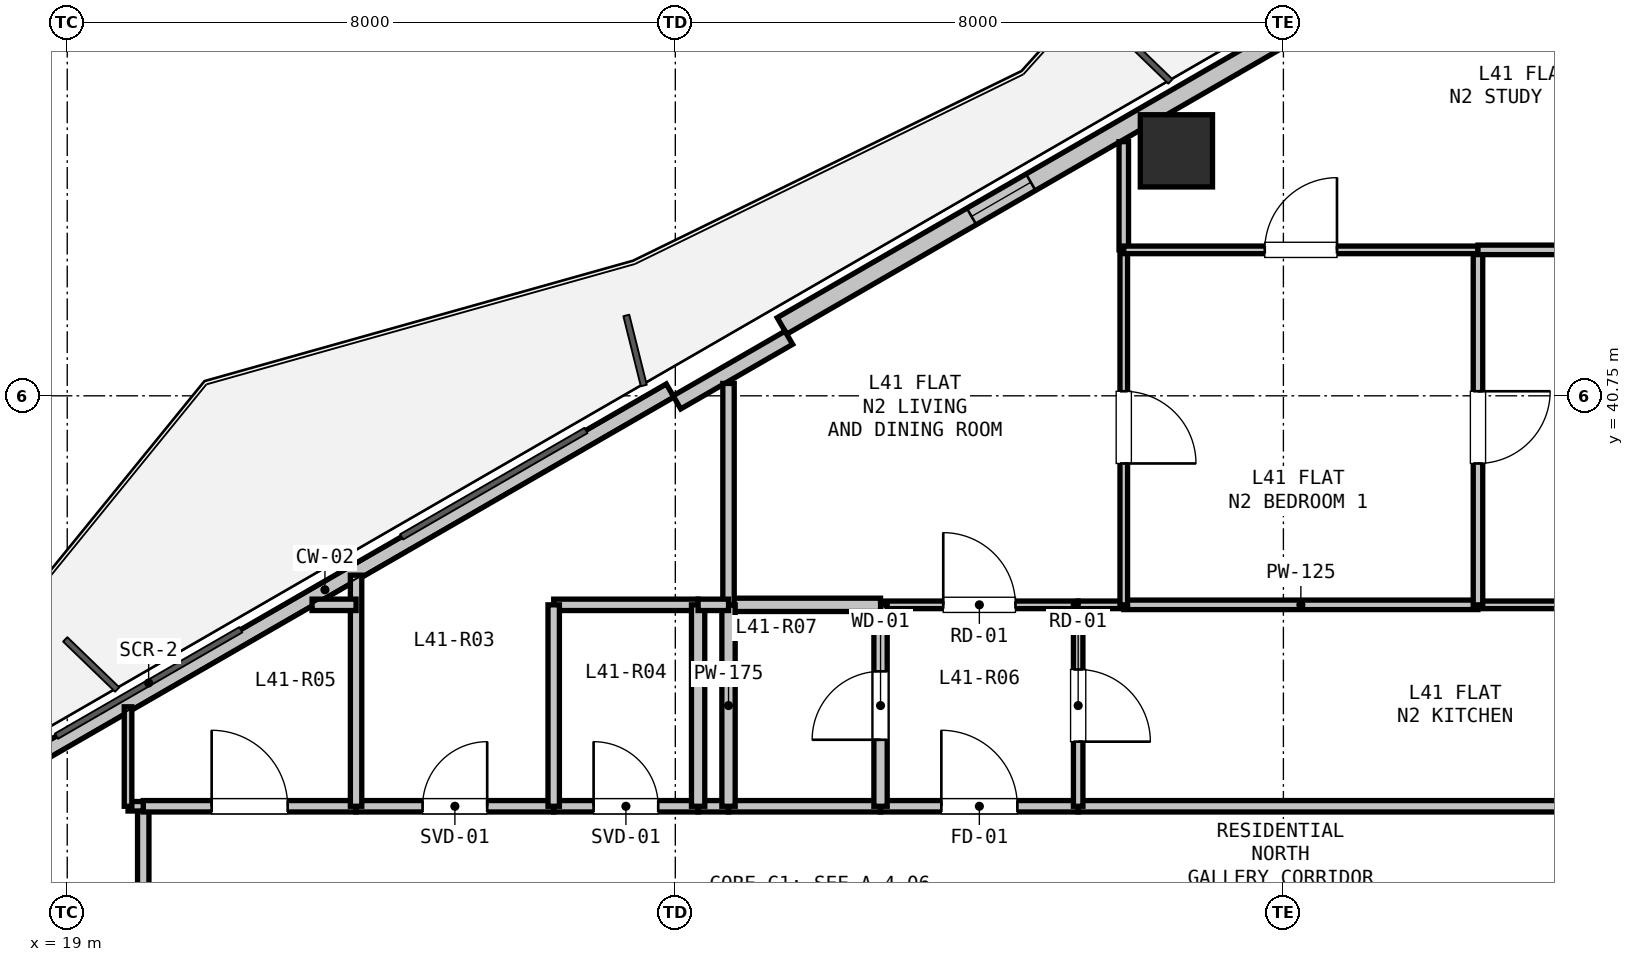
"""IFC4 building model, lengths in metres.
Left out: names, types, materials, properties, quantities, classifications, styles, units other than length and angle.
Written with IfcOpenShell. Run it as: python <this file> out.ifc"""

import sys

from ifc_helpers import new_model, si_unit, direction, frame, frame_2d, origin, origin_2d, place, context, subcontext, project, spatial, rectangle, hollow_rectangle, extrude, element, fill, save


model = new_model("IFC4")
c1 = context("Model", 3, precision=1e-05, world=origin(), true_north=direction((0.0, 1.0)))
c2 = subcontext(c1, "Body", "Model", "MODEL_VIEW")
j1 = project(units=[si_unit("LENGTHUNIT", "METRE"), si_unit("PLANEANGLEUNIT", "RADIAN")], contexts=[c1])
p1 = place(None, origin())
s1 = spatial("IfcSite", under=j1, at=p1, CompositionType="ELEMENT")
p2 = place(p1, origin())
s2 = spatial("IfcBuilding", under=s1, at=p2, CompositionType="ELEMENT")
p3 = place(p2, frame((0.0, 0.0, 147.6)))
s3 = spatial("IfcBuildingStorey", under=s2, at=p3, CompositionType="ELEMENT", Elevation=147.6)
p4 = place(p3, frame((33.593, 43.973, 0.0), z_axis=(0.0, 0.0, 1.0), x_axis=(1.0, 0.0, 0.0)))
e1 = element("IfcColumn", 1, at=p4, inside=s3, PredefinedType="COLUMN", context=c2, shape_type="SweptSolid", body=[
    extrude(hollow_rectangle(XDim=0.95, YDim=0.95, WallThickness=0.028, at=origin_2d()), origin(), (0.0, 0.0, 1.0), 3.3),
])
p5 = place(p3, frame((38.22, 47.338, 0.0), z_axis=(0.0, 0.0, 1.0), x_axis=(0.866035021055, -0.499983342029, 0.0)))
e2 = element("IfcWall", 2, at=p5, inside=s3, PredefinedType="SOLIDWALL", context=c2, shape_type="SweptSolid", body=[
    extrude(rectangle(XDim=4.617, YDim=0.25, at=frame_2d((2.309, 0.0))), origin(), (0.0, 0.0, 1.0), 2.68),
])
p6 = place(p3, frame((17.85, 35.577, 0.0), z_axis=(0.0, 0.0, 1.0), x_axis=(0.866026619769, 0.499997893847, 0.0)))
e3 = element("IfcWall", 3, at=p6, inside=s3, PredefinedType="PARAPET", context=c2, shape_type="SweptSolid", body=[
    extrude(rectangle(XDim=10.486, YDim=0.2, at=frame_2d((5.243, 0.0))), origin(), (0.0, 0.0, 1.0), 0.2),
])
p7 = place(p3, frame((28.403, 41.67, 0.0), z_axis=(0.0, 0.0, 1.0), x_axis=(0.86602239209, 0.500005216371, 0.0)))
e4 = element("IfcWall", 4, at=p7, inside=s3, PredefinedType="SOLIDWALL", context=c2, shape_type="SweptSolid", body=[
    extrude(rectangle(XDim=11.186, YDim=0.25, at=frame_2d((5.593, 0.0))), origin(), (0.0, 0.0, 1.0), 2.68),
])
p8 = place(p7, frame((2.88, 0.0, 0.9)))
e5 = element("IfcOpeningElement", 5, at=p8, cuts=e4, PredefinedType="OPENING", context=c2, shape_type="SweptSolid", body=[
    extrude(rectangle(XDim=0.9, YDim=1.4, at=frame_2d((0.45, 0.7))), frame((0.0, 0.135, 0.0), z_axis=(0.0, -1.0, 0.0), x_axis=(1.0, 0.0, 0.0)), (0.0, 0.0, 1.0), 0.27),
])
p9 = place(p3, frame((27.021, 40.664, 0.0), z_axis=(0.0, 0.0, 1.0), x_axis=(0.86605165483, 0.499954529098, 0.0)))
e6 = element("IfcWall", 6, at=p9, inside=s3, PredefinedType="PARAPET", context=c2, shape_type="SweptSolid", body=[
    extrude(rectangle(XDim=1.7, YDim=0.2, at=frame_2d((0.85, 0.0))), origin(), (0.0, 0.0, 1.0), 2.68),
])
p10 = place(p3, frame((20.0, 32.75, 0.0), z_axis=(0.0, 0.0, 1.0), x_axis=(0.0, 1.0, 0.0)))
e7 = element("IfcWall", 7, at=p10, inside=s3, PredefinedType="PARTITIONING", context=c2, shape_type="SweptSolid", body=[
    extrude(rectangle(XDim=2.6, YDim=0.15, at=frame_2d((1.3, 0.0))), origin(), (0.0, 0.0, 1.0), 2.433),
])
p11 = place(p3, frame((20.0, 35.35, 0.0), z_axis=(0.0, 0.0, 1.0), x_axis=(1.0, 0.0, 0.0)))
e8 = element("IfcWall", 8, at=p11, inside=s3, PredefinedType="PARTITIONING", context=c2, shape_type="SweptSolid", body=[
    extrude(rectangle(XDim=2.8, YDim=0.15, at=frame_2d((1.4, 0.0))), origin(), (0.0, 0.0, 1.0), 3.06),
])
p12 = place(p11, frame((0.9, 0.0, 0.0)))
e9 = element("IfcOpeningElement", 9, at=p12, cuts=e8, PredefinedType="OPENING", context=c2, shape_type="SweptSolid", body=[
    extrude(rectangle(XDim=1.0, YDim=2.15, at=frame_2d((0.5, 1.075))), frame((0.0, 0.085, 0.0), z_axis=(0.0, -1.0, 0.0), x_axis=(1.0, 0.0, 0.0)), (0.0, 0.0, 1.0), 0.17),
])
p13 = place(p3, frame((22.8, 35.35, 0.0), z_axis=(0.0, 0.0, 1.0), x_axis=(1.0, 0.0, 0.0)))
e10 = element("IfcWall", 10, at=p13, inside=s3, PredefinedType="PARTITIONING", context=c2, shape_type="SweptSolid", body=[
    extrude(rectangle(XDim=2.6, YDim=0.15, at=frame_2d((1.3, 0.0))), origin(), (0.0, 0.0, 1.0), 3.06),
])
p14 = place(p13, frame((0.875, 0.0, 0.0)))
e11 = element("IfcOpeningElement", 11, at=p14, cuts=e10, PredefinedType="OPENING", context=c2, shape_type="SweptSolid", body=[
    extrude(rectangle(XDim=0.85, YDim=2.1, at=frame_2d((0.425, 1.05))), frame((0.0, 0.085, 0.0), z_axis=(0.0, -1.0, 0.0), x_axis=(1.0, 0.0, 0.0)), (0.0, 0.0, 1.0), 0.17),
])
p15 = place(p3, frame((25.4, 35.35, 0.0), z_axis=(0.0, 0.0, 1.0), x_axis=(1.0, 0.0, 0.0)))
e12 = element("IfcWall", 12, at=p15, inside=s3, PredefinedType="PARTITIONING", context=c2, shape_type="SweptSolid", body=[
    extrude(rectangle(XDim=1.9, YDim=0.15, at=frame_2d((0.95, 0.0))), origin(), (0.0, 0.0, 1.0), 3.06),
])
p16 = place(p15, frame((0.525, 0.0, 0.0)))
e13 = element("IfcOpeningElement", 13, at=p16, cuts=e12, PredefinedType="OPENING", context=c2, shape_type="SweptSolid", body=[
    extrude(rectangle(XDim=0.85, YDim=2.1, at=frame_2d((0.425, 1.05))), frame((0.0, 0.085, 0.0), z_axis=(0.0, -1.0, 0.0), x_axis=(1.0, 0.0, 0.0)), (0.0, 0.0, 1.0), 0.17),
])
p17 = place(p3, frame((27.3, 35.35, 0.0), z_axis=(0.0, 0.0, 1.0), x_axis=(1.0, 0.0, 0.0)))
e14 = element("IfcWall", 14, at=p17, inside=s3, PredefinedType="PARTITIONING", context=c2, shape_type="SweptSolid", body=[
    extrude(rectangle(XDim=0.4, YDim=0.15, at=frame_2d((0.2, 0.0))), origin(), (0.0, 0.0, 1.0), 3.06),
])
p18 = place(p3, frame((27.7, 35.35, 0.0), z_axis=(0.0, 0.0, 1.0), x_axis=(1.0, 0.0, 0.0)))
e15 = element("IfcWall", 15, at=p18, inside=s3, PredefinedType="PARTITIONING", context=c2, shape_type="SweptSolid", body=[
    extrude(rectangle(XDim=2.0, YDim=0.15, at=frame_2d((1.0, 0.0))), origin(), (0.0, 0.0, 1.0), 3.06),
])
p19 = place(p3, frame((29.7, 35.35, 0.0), z_axis=(0.0, 0.0, 1.0), x_axis=(1.0, 0.0, 0.0)))
e16 = element("IfcWall", 16, at=p19, inside=s3, PredefinedType="PARTITIONING", context=c2, shape_type="SweptSolid", body=[
    extrude(rectangle(XDim=2.6, YDim=0.15, at=frame_2d((1.3, 0.0))), origin(), (0.0, 0.0, 1.0), 3.06),
])
p20 = place(p19, frame((0.8, 0.0, 0.0)))
e17 = element("IfcOpeningElement", 17, at=p20, cuts=e16, PredefinedType="OPENING", context=c2, shape_type="SweptSolid", body=[
    extrude(rectangle(XDim=1.0, YDim=2.15, at=frame_2d((0.5, 1.075))), frame((0.0, 0.085, 0.0), z_axis=(0.0, -1.0, 0.0), x_axis=(1.0, 0.0, 0.0)), (0.0, 0.0, 1.0), 0.17),
])
p21 = place(p3, frame((32.3, 35.35, 0.0), z_axis=(0.0, 0.0, 1.0), x_axis=(1.0, 0.0, 0.0)))
e18 = element("IfcWall", 18, at=p21, inside=s3, PredefinedType="PARTITIONING", context=c2, shape_type="SweptSolid", body=[
    extrude(rectangle(XDim=6.9, YDim=0.15, at=frame_2d((3.45, 0.0))), origin(), (0.0, 0.0, 1.0), 2.433),
])
p22 = place(p3, frame((29.7, 38.0, 0.0), z_axis=(0.0, 0.0, 1.0), x_axis=(1.0, 0.0, 0.0)))
e19 = element("IfcWall", 19, at=p22, inside=s3, PredefinedType="PARTITIONING", context=c2, shape_type="SweptSolid", body=[
    extrude(rectangle(XDim=2.6, YDim=0.1, at=frame_2d((1.3, 0.0))), origin(), (0.0, 0.0, 1.0), 3.06),
])
p23 = place(p22, frame((0.825, 0.0, 0.0)))
e20 = element("IfcOpeningElement", 20, at=p23, cuts=e19, PredefinedType="OPENING", context=c2, shape_type="SweptSolid", body=[
    extrude(rectangle(XDim=0.95, YDim=2.1, at=frame_2d((0.475, 1.05))), frame((0.0, 0.06, 0.0), z_axis=(0.0, -1.0, 0.0), x_axis=(1.0, 0.0, 0.0)), (0.0, 0.0, 1.0), 0.12),
])
p24 = place(p3, frame((32.3, 38.0, 0.0), z_axis=(0.0, 0.0, 1.0), x_axis=(0.0, -1.0, 0.0)))
e21 = element("IfcWall", 21, at=p24, inside=s3, PredefinedType="PARTITIONING", context=c2, shape_type="SweptSolid", body=[
    extrude(rectangle(XDim=2.65, YDim=0.125, at=frame_2d((1.325, 0.0))), origin(), (0.0, 0.0, 1.0), 3.06),
])
p25 = place(p24, frame((0.85, 0.0, 0.0)))
e22 = element("IfcOpeningElement", 22, at=p25, cuts=e21, PredefinedType="OPENING", context=c2, shape_type="SweptSolid", body=[
    extrude(rectangle(XDim=0.95, YDim=2.1, at=frame_2d((0.475, 1.05))), frame((0.0, 0.073, 0.0), z_axis=(0.0, -1.0, 0.0), x_axis=(1.0, 0.0, 0.0)), (0.0, 0.0, 1.0), 0.145),
])
p26 = place(p3, frame((29.7, 35.35, 0.0), z_axis=(0.0, 0.0, 1.0), x_axis=(0.0, 1.0, 0.0)))
e23 = element("IfcWall", 23, at=p26, inside=s3, PredefinedType="PLUMBINGWALL", context=c2, shape_type="SweptSolid", body=[
    extrude(rectangle(XDim=2.65, YDim=0.175, at=frame_2d((1.325, 0.0))), origin(), (0.0, 0.0, 1.0), 3.06),
])
p27 = place(p26, frame((0.875, 0.0, 0.0)))
e24 = element("IfcOpeningElement", 24, at=p27, cuts=e23, PredefinedType="OPENING", context=c2, shape_type="SweptSolid", body=[
    extrude(rectangle(XDim=0.9, YDim=2.1, at=frame_2d((0.45, 1.05))), frame((0.0, 0.097, 0.0), z_axis=(0.0, -1.0, 0.0), x_axis=(1.0, 0.0, 0.0)), (0.0, 0.0, 1.0), 0.195),
])
p28 = place(p3, frame((25.4, 38.0, 0.0), z_axis=(0.0, 0.0, 1.0), x_axis=(1.0, 0.0, 0.0)))
e25 = element("IfcWall", 25, at=p28, inside=s3, PredefinedType="PARTITIONING", context=c2, shape_type="SweptSolid", body=[
    extrude(rectangle(XDim=1.9, YDim=0.15, at=frame_2d((0.95, 0.0))), origin(), (0.0, 0.0, 1.0), 3.06),
])
p29 = place(p3, frame((27.3, 38.0, 0.0), z_axis=(0.0, 0.0, 1.0), x_axis=(0.0, -1.0, 0.0)))
e26 = element("IfcWall", 26, at=p29, inside=s3, PredefinedType="PLUMBINGWALL", context=c2, shape_type="SweptSolid", body=[
    extrude(rectangle(XDim=2.65, YDim=0.175, at=frame_2d((1.325, 0.0))), origin(), (0.0, 0.0, 1.0), 3.06),
])
p30 = place(p3, frame((25.4, 35.35, 0.0), z_axis=(0.0, 0.0, 1.0), x_axis=(0.0, 1.0, 0.0)))
e27 = element("IfcWall", 27, at=p30, inside=s3, PredefinedType="PARTITIONING", context=c2, shape_type="SweptSolid", body=[
    extrude(rectangle(XDim=2.65, YDim=0.15, at=frame_2d((1.325, 0.0))), origin(), (0.0, 0.0, 1.0), 3.06),
])
p31 = place(p3, frame((27.7, 38.0, 0.0), z_axis=(0.0, 0.0, 1.0), x_axis=(1.0, 0.0, 0.0)))
e28 = element("IfcWall", 28, at=p31, inside=s3, PredefinedType="PLUMBINGWALL", context=c2, shape_type="SweptSolid", body=[
    extrude(rectangle(XDim=2.0, YDim=0.175, at=frame_2d((1.0, 0.0))), origin(), (0.0, 0.0, 1.0), 3.06),
])
p32 = place(p3, frame((27.7, 35.35, 0.0), z_axis=(0.0, 0.0, 1.0), x_axis=(0.0, 1.0, 0.0)))
e29 = element("IfcWall", 29, at=p32, inside=s3, PredefinedType="PLUMBINGWALL", context=c2, shape_type="SweptSolid", body=[
    extrude(rectangle(XDim=2.65, YDim=0.175, at=frame_2d((1.325, 0.0))), origin(), (0.0, 0.0, 1.0), 3.06),
])
p33 = place(p3, frame((32.3, 38.0, 0.0), z_axis=(0.0, 0.0, 1.0), x_axis=(1.0, 0.0, 0.0)))
e30 = element("IfcWall", 30, at=p33, inside=s3, PredefinedType="PARTITIONING", context=c2, shape_type="SweptSolid", body=[
    extrude(rectangle(XDim=0.6, YDim=0.1, at=frame_2d((0.3, 0.0))), origin(), (0.0, 0.0, 1.0), 3.06),
])
p34 = place(p3, frame((32.9, 38.0, 0.0), z_axis=(0.0, 0.0, 1.0), x_axis=(1.0, 0.0, 0.0)))
e31 = element("IfcWall", 31, at=p34, inside=s3, PredefinedType="PARTITIONING", context=c2, shape_type="SweptSolid", body=[
    extrude(rectangle(XDim=4.66, YDim=0.125, at=frame_2d((2.33, 0.0))), origin(), (0.0, 0.0, 1.0), 2.433),
])
p35 = place(p3, frame((37.56, 38.0, 0.0), z_axis=(0.0, 0.0, 1.0), x_axis=(1.0, 0.0, 0.0)))
e32 = element("IfcWall", 32, at=p35, inside=s3, PredefinedType="PARTITIONING", context=c2, shape_type="SweptSolid", body=[
    extrude(rectangle(XDim=4.51, YDim=0.1, at=frame_2d((2.255, 0.0))), origin(), (0.0, 0.0, 1.0), 2.365),
])
p36 = place(p3, frame((27.7, 40.913, 0.0), z_axis=(0.0, 0.0, 1.0), x_axis=(0.0, -1.0, 0.0)))
e33 = element("IfcWall", 33, at=p36, inside=s3, PredefinedType="PARTITIONING", context=c2, shape_type="SweptSolid", body=[
    extrude(rectangle(XDim=2.913, YDim=0.15, at=frame_2d((1.456, 0.0))), origin(), (0.0, 0.0, 1.0), 2.365),
])
p37 = place(p3, frame((27.7, 38.0, 0.0), z_axis=(0.0, 0.0, 1.0), x_axis=(-1.0, 0.0, 0.0)))
e34 = element("IfcWall", 34, at=p37, inside=s3, PredefinedType="PARTITIONING", context=c2, shape_type="SweptSolid", body=[
    extrude(rectangle(XDim=0.4, YDim=0.15, at=frame_2d((0.2, 0.0))), origin(), (0.0, 0.0, 1.0), 3.06),
])
p38 = place(p3, frame((22.8, 35.35, 0.0), z_axis=(0.0, 0.0, 1.0), x_axis=(0.0, 1.0, 0.0)))
e35 = element("IfcWall", 35, at=p38, inside=s3, PredefinedType="PARTITIONING", context=c2, shape_type="SweptSolid", body=[
    extrude(rectangle(XDim=3.041, YDim=0.15, at=frame_2d((1.52, 0.0))), origin(), (0.0, 0.0, 1.0), 2.365),
])
p39 = place(p3, frame((22.8, 38.0, 0.0), z_axis=(0.0, 0.0, 1.0), x_axis=(-1.0, 0.0, 0.0)))
e36 = element("IfcWall", 36, at=p39, inside=s3, PredefinedType="PARTITIONING", context=c2, shape_type="SweptSolid", body=[
    extrude(rectangle(XDim=0.579, YDim=0.15, at=frame_2d((0.29, 0.0))), origin(), (0.0, 0.0, 1.0), 3.06),
])
p40 = place(p3, frame((20.0, 35.35, 0.0), z_axis=(0.0, 0.0, 1.0), x_axis=(-1.0, 0.0, 0.0)))
e37 = element("IfcWall", 37, at=p40, inside=s3, PredefinedType="PARTITIONING", context=c2, shape_type="SweptSolid", body=[
    extrude(rectangle(XDim=0.2, YDim=0.125, at=frame_2d((0.1, 0.0))), origin(), (0.0, 0.0, 1.0), 3.06),
])
p41 = place(p3, frame((19.8, 35.35, 0.0), z_axis=(0.0, 0.0, 1.0), x_axis=(0.0, 1.0, 0.0)))
e38 = element("IfcWall", 38, at=p41, inside=s3, PredefinedType="PARTITIONING", context=c2, shape_type="SweptSolid", body=[
    extrude(rectangle(XDim=1.309, YDim=0.1, at=frame_2d((0.654, 0.0))), origin(), (0.0, 0.0, 1.0), 2.365),
])
p42 = place(p3, frame((32.9, 44.094, 0.0), z_axis=(0.0, 0.0, 1.0), x_axis=(0.0, -1.0, 0.0)))
e39 = element("IfcWall", 39, at=p42, inside=s3, PredefinedType="PARTITIONING", context=c2, shape_type="SweptSolid", body=[
    extrude(rectangle(XDim=1.424, YDim=0.125, at=frame_2d((0.712, 0.0))), origin(), (0.0, 0.0, 1.0), 2.365),
])
p43 = place(p3, frame((32.9, 42.67, 0.0), z_axis=(0.0, 0.0, 1.0), x_axis=(0.0, -1.0, 0.0)))
e40 = element("IfcWall", 40, at=p43, inside=s3, PredefinedType="PARTITIONING", context=c2, shape_type="SweptSolid", body=[
    extrude(rectangle(XDim=4.67, YDim=0.1, at=frame_2d((2.335, 0.0))), origin(), (0.0, 0.0, 1.0), 3.06),
])
p44 = place(p43, frame((1.86, 0.0, 0.0)))
e41 = element("IfcOpeningElement", 41, at=p44, cuts=e40, PredefinedType="OPENING", context=c2, shape_type="SweptSolid", body=[
    extrude(rectangle(XDim=0.95, YDim=2.1, at=frame_2d((0.475, 1.05))), frame((0.0, 0.06, 0.0), z_axis=(0.0, -1.0, 0.0), x_axis=(1.0, 0.0, 0.0)), (0.0, 0.0, 1.0), 0.12),
])
p45 = place(p3, frame((37.56, 42.67, 0.0), z_axis=(0.0, 0.0, 1.0), x_axis=(0.0, -1.0, 0.0)))
e42 = element("IfcWall", 42, at=p45, inside=s3, PredefinedType="PARTITIONING", context=c2, shape_type="SweptSolid", body=[
    extrude(rectangle(XDim=4.67, YDim=0.125, at=frame_2d((2.335, 0.0))), origin(), (0.0, 0.0, 1.0), 2.433),
])
p46 = place(p45, frame((1.86, 0.0, 0.0)))
e43 = element("IfcOpeningElement", 43, at=p46, cuts=e42, PredefinedType="OPENING", context=c2, shape_type="SweptSolid", body=[
    extrude(rectangle(XDim=0.95, YDim=2.1, at=frame_2d((0.475, 1.05))), frame((0.0, 0.073, 0.0), z_axis=(0.0, -1.0, 0.0), x_axis=(1.0, 0.0, 0.0)), (0.0, 0.0, 1.0), 0.145),
])
p47 = place(p3, frame((32.9, 42.67, 0.0), z_axis=(0.0, 0.0, 1.0), x_axis=(1.0, 0.0, 0.0)))
e44 = element("IfcWall", 44, at=p47, inside=s3, PredefinedType="PARTITIONING", context=c2, shape_type="SweptSolid", body=[
    extrude(rectangle(XDim=4.66, YDim=0.1, at=frame_2d((2.33, 0.0))), origin(), (0.0, 0.0, 1.0), 2.433),
])
p48 = place(p47, frame((1.855, 0.0, 0.0)))
e45 = element("IfcOpeningElement", 45, at=p48, cuts=e44, PredefinedType="OPENING", context=c2, shape_type="SweptSolid", body=[
    extrude(rectangle(XDim=0.95, YDim=2.1, at=frame_2d((0.475, 1.05))), frame((0.0, 0.06, 0.0), z_axis=(0.0, -1.0, 0.0), x_axis=(1.0, 0.0, 0.0)), (0.0, 0.0, 1.0), 0.12),
])
p49 = place(p3, frame((37.56, 42.67, 0.0), z_axis=(0.0, 0.0, 1.0), x_axis=(1.0, 0.0, 0.0)))
e46 = element("IfcWall", 46, at=p49, inside=s3, PredefinedType="PARTITIONING", context=c2, shape_type="SweptSolid", body=[
    extrude(rectangle(XDim=4.51, YDim=0.125, at=frame_2d((2.255, 0.0))), origin(), (0.0, 0.0, 1.0), 2.433),
])
p50 = place(p8, origin())
e47 = element("IfcWindow", 47, at=p50, inside=s3, PartitioningType="SINGLE_PANEL", PredefinedType="WINDOW", context=c2, shape_type="SweptSolid", body=[
    extrude(rectangle(XDim=0.9, YDim=1.4, at=frame_2d((0.45, 0.7))), frame((0.0, 0.03, 0.0), z_axis=(0.0, -1.0, 0.0), x_axis=(1.0, 0.0, 0.0)), (0.0, 0.0, 1.0), 0.06),
])
fill(e5, e47)
p51 = place(p20, origin())
e48 = element("IfcDoor", 48, at=p51, inside=s3, OperationType="SINGLE_SWING_LEFT", PredefinedType="DOOR", context=c2, shape_type="SweptSolid", body=[
    extrude(rectangle(XDim=1.0, YDim=2.15, at=frame_2d((0.5, 1.075))), frame((0.0, 0.025, 0.0), z_axis=(0.0, -1.0, 0.0), x_axis=(1.0, 0.0, 0.0)), (0.0, 0.0, 1.0), 0.05),
])
fill(e17, e48)
p52 = place(p16, origin())
e49 = element("IfcDoor", 49, at=p52, inside=s3, OperationType="SINGLE_SWING_LEFT", PredefinedType="DOOR", context=c2, shape_type="SweptSolid", body=[
    extrude(rectangle(XDim=0.85, YDim=2.1, at=frame_2d((0.425, 1.05))), frame((0.0, 0.025, 0.0), z_axis=(0.0, -1.0, 0.0), x_axis=(1.0, 0.0, 0.0)), (0.0, 0.0, 1.0), 0.05),
])
fill(e13, e49)
p53 = place(p14, origin())
e50 = element("IfcDoor", 50, at=p53, inside=s3, OperationType="SINGLE_SWING_RIGHT", PredefinedType="DOOR", context=c2, shape_type="SweptSolid", body=[
    extrude(rectangle(XDim=0.85, YDim=2.1, at=frame_2d((0.425, 1.05))), frame((0.0, 0.025, 0.0), z_axis=(0.0, -1.0, 0.0), x_axis=(1.0, 0.0, 0.0)), (0.0, 0.0, 1.0), 0.05),
])
fill(e11, e50)
p54 = place(p12, origin())
e51 = element("IfcDoor", 51, at=p54, inside=s3, OperationType="SINGLE_SWING_LEFT", PredefinedType="DOOR", context=c2, shape_type="SweptSolid", body=[
    extrude(rectangle(XDim=1.0, YDim=2.15, at=frame_2d((0.5, 1.075))), frame((0.0, 0.025, 0.0), z_axis=(0.0, -1.0, 0.0), x_axis=(1.0, 0.0, 0.0)), (0.0, 0.0, 1.0), 0.05),
])
fill(e9, e51)
p55 = place(p27, origin())
e52 = element("IfcDoor", 52, at=p55, inside=s3, OperationType="SINGLE_SWING_LEFT", PredefinedType="DOOR", context=c2, shape_type="SweptSolid", body=[
    extrude(rectangle(XDim=0.9, YDim=2.1, at=frame_2d((0.45, 1.05))), frame((0.0, 0.025, 0.0), z_axis=(0.0, -1.0, 0.0), x_axis=(1.0, 0.0, 0.0)), (0.0, 0.0, 1.0), 0.05),
])
fill(e24, e52)
p56 = place(p25, origin())
e53 = element("IfcDoor", 53, at=p56, inside=s3, OperationType="SINGLE_SWING_RIGHT", PredefinedType="DOOR", context=c2, shape_type="SweptSolid", body=[
    extrude(rectangle(XDim=0.95, YDim=2.1, at=frame_2d((0.475, 1.05))), frame((0.0, 0.025, 0.0), z_axis=(0.0, -1.0, 0.0), x_axis=(1.0, 0.0, 0.0)), (0.0, 0.0, 1.0), 0.05),
])
fill(e22, e53)
p57 = place(p23, origin())
e54 = element("IfcDoor", 54, at=p57, inside=s3, OperationType="SINGLE_SWING_LEFT", PredefinedType="DOOR", context=c2, shape_type="SweptSolid", body=[
    extrude(rectangle(XDim=0.95, YDim=2.1, at=frame_2d((0.475, 1.05))), frame((0.0, 0.025, 0.0), z_axis=(0.0, -1.0, 0.0), x_axis=(1.0, 0.0, 0.0)), (0.0, 0.0, 1.0), 0.05),
])
fill(e20, e54)
p58 = place(p44, origin())
e55 = element("IfcDoor", 55, at=p58, inside=s3, OperationType="SINGLE_SWING_RIGHT", PredefinedType="DOOR", context=c2, shape_type="SweptSolid", body=[
    extrude(rectangle(XDim=0.95, YDim=2.1, at=frame_2d((0.475, 1.05))), frame((0.0, 0.025, 0.0), z_axis=(0.0, -1.0, 0.0), x_axis=(1.0, 0.0, 0.0)), (0.0, 0.0, 1.0), 0.05),
])
fill(e41, e55)
p59 = place(p46, origin())
e56 = element("IfcDoor", 56, at=p59, inside=s3, OperationType="SINGLE_SWING_LEFT", PredefinedType="DOOR", context=c2, shape_type="SweptSolid", body=[
    extrude(rectangle(XDim=0.95, YDim=2.1, at=frame_2d((0.475, 1.05))), frame((0.0, 0.025, 0.0), z_axis=(0.0, -1.0, 0.0), x_axis=(1.0, 0.0, 0.0)), (0.0, 0.0, 1.0), 0.05),
])
fill(e43, e56)
p60 = place(p48, origin())
e57 = element("IfcDoor", 57, at=p60, inside=s3, OperationType="SINGLE_SWING_RIGHT", PredefinedType="DOOR", context=c2, shape_type="SweptSolid", body=[
    extrude(rectangle(XDim=0.95, YDim=2.1, at=frame_2d((0.475, 1.05))), frame((0.0, 0.025, 0.0), z_axis=(0.0, -1.0, 0.0), x_axis=(1.0, 0.0, 0.0)), (0.0, 0.0, 1.0), 0.05),
])
fill(e45, e57)
save(model, sys.argv[1])
